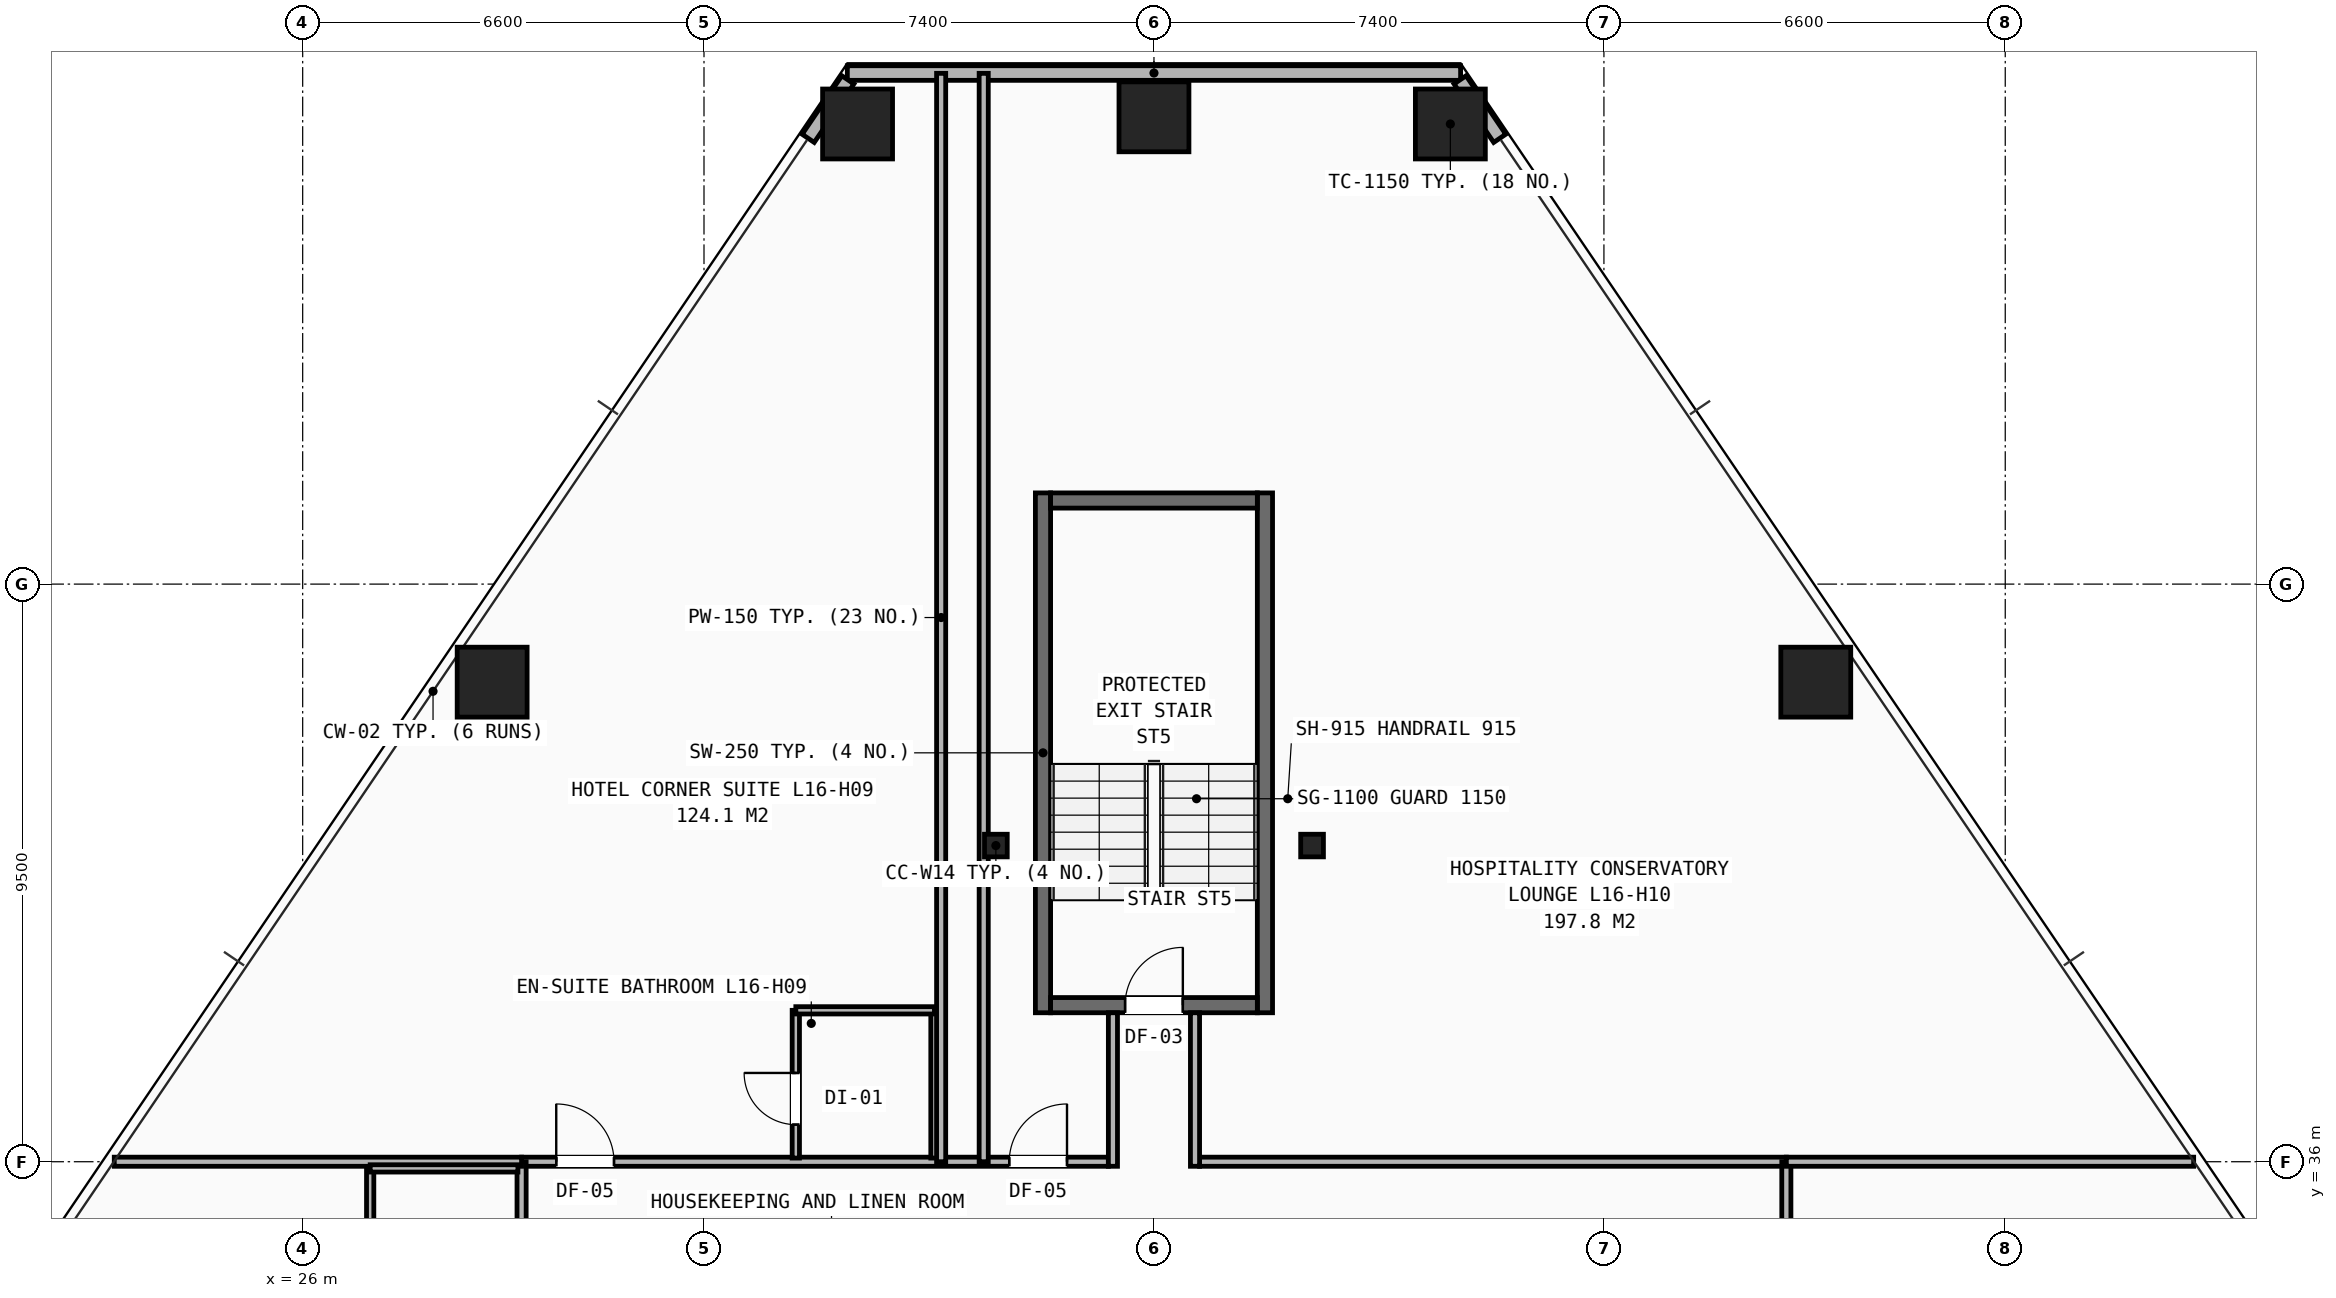
"""IFC4 building model, lengths in metres.
Left out: names, types, materials, properties, quantities, classifications, styles, units other than length and angle.
Written with IfcOpenShell. Run it as: python <this file> out.ifc"""

import sys

from ifc_helpers import new_model, si_unit, direction, frame, frame_2d, origin, origin_2d, place, context, subcontext, project, spatial, rectangle, hollow_rectangle, i_section, extrude, element, fill, save


model = new_model("IFC4")
c1 = context("Model", 3, precision=1e-05, world=origin(), true_north=direction((0.0, 1.0)))
c2 = subcontext(c1, "Body", "Model", "MODEL_VIEW")
j1 = project(units=[si_unit("LENGTHUNIT", "METRE"), si_unit("PLANEANGLEUNIT", "RADIAN")], contexts=[c1])
p1 = place(None, origin())
s1 = spatial("IfcSite", under=j1, at=p1, CompositionType="ELEMENT")
p2 = place(p1, origin())
s2 = spatial("IfcBuilding", under=s1, at=p2, CompositionType="ELEMENT")
p3 = place(p2, frame((0.0, 0.0, 59.2)))
s3 = spatial("IfcBuildingStorey", under=s2, at=p3, CompositionType="ELEMENT", Elevation=59.2)
for number, where, z_axis, x_axis in (
    (1, (37.4, 41.2, 0.0), (0.0, 0.0, 1.0), (1.0, 0.0, 0.0)),
    (2, (42.6, 41.2, 0.0), (0.0, 0.0, 1.0), (1.0, 0.0, 0.0)),
):
    element("IfcColumn", number, at=place(p3, frame(where, z_axis=z_axis, x_axis=x_axis)), inside=s3, PredefinedType="COLUMN", context=c2, shape_type="SweptSolid", body=[
        extrude(i_section(OverallWidth=0.374, OverallDepth=0.372, WebThickness=0.016, FlangeThickness=0.026, at=origin_2d()), origin(), (0.0, 0.0, 1.0), 3.2),
    ])
for number, where, z_axis, x_axis in (
    (3, (44.875, 53.068, 0.0), (0.0, 0.0, 1.0), (1.0, 0.0, 0.0)),
    (4, (40.0, 53.186, 0.0), (0.0, 0.0, 1.0), (1.0, 0.0, 0.0)),
    (5, (35.125, 53.068, 0.0), (0.0, 0.0, 1.0), (1.0, 0.0, 0.0)),
    (6, (29.116, 43.887, 0.0), (0.0, 0.0, 1.0), (1.0, 0.0, 0.0)),
    (7, (50.884, 43.887, 0.0), (0.0, 0.0, 1.0), (1.0, 0.0, 0.0)),
):
    element("IfcColumn", number, at=place(p3, frame(where, z_axis=z_axis, x_axis=x_axis)), inside=s3, PredefinedType="COLUMN", context=c2, shape_type="SweptSolid", body=[
        extrude(hollow_rectangle(XDim=1.15, YDim=1.15, WallThickness=0.075, at=origin_2d()), origin(), (0.0, 0.0, 1.0), 3.2),
    ])
p4 = place(p3, frame((34.957, 53.906, 0.0), z_axis=(0.0, 0.0, 1.0), x_axis=(1.0, 0.0, 0.0)))
e8 = element("IfcWall", 8, at=p4, inside=s3, PredefinedType="SHEAR", context=c2, shape_type="SweptSolid", body=[
    extrude(rectangle(XDim=10.086, YDim=0.24, at=frame_2d((5.043, 0.0))), origin(), (0.0, 0.0, 1.0), 2.263),
])
for number, where, z_axis, x_axis in (
    (9, (34.966, 53.794, 0.0), (0.0, 0.0, 1.0), (-0.561, -0.828, 0.0)),
    (10, (45.687, 52.832, 0.0), (0.0, 0.0, 1.0), (-0.561, 0.828, 0.0)),
):
    element("IfcWall", number, at=place(p3, frame(where, z_axis=z_axis, x_axis=x_axis)), inside=s3, PredefinedType="SHEAR", context=c2, shape_type="SweptSolid", body=[
        extrude(rectangle(XDim=1.163, YDim=0.24, at=frame_2d((0.581, 0.0))), origin(), (0.0, 0.0, 1.0), 2.263),
    ])
p5 = place(p3, frame((29.6, 36.0, 0.0), z_axis=(0.0, 0.0, 1.0), x_axis=(1.0, 0.0, 0.0)))
e11 = element("IfcWall", 11, at=p5, inside=s3, PredefinedType="PARTITIONING", context=c2, shape_type="SweptSolid", body=[
    extrude(rectangle(XDim=9.65, YDim=0.15, at=frame_2d((4.825, 0.0))), origin(), (0.0, 0.0, 1.0), 2.98),
])
p6 = place(p5, frame((0.57, 0.0, 0.0)))
e12 = element("IfcOpeningElement", 12, at=p6, cuts=e11, PredefinedType="OPENING", context=c2, shape_type="SweptSolid", body=[
    extrude(rectangle(XDim=0.95, YDim=2.1, at=frame_2d((0.475, 1.05))), frame((0.0, 0.085, 0.0), z_axis=(0.0, -1.0, 0.0), x_axis=(1.0, 0.0, 0.0)), (0.0, 0.0, 1.0), 0.17),
])
p7 = place(p5, frame((8.02, 0.0, 0.0)))
e13 = element("IfcOpeningElement", 13, at=p7, cuts=e11, PredefinedType="OPENING", context=c2, shape_type="SweptSolid", body=[
    extrude(rectangle(XDim=0.95, YDim=2.1, at=frame_2d((0.475, 1.05))), frame((0.0, 0.085, 0.0), z_axis=(0.0, -1.0, 0.0), x_axis=(1.0, 0.0, 0.0)), (0.0, 0.0, 1.0), 0.17),
])
p8 = place(p3, frame((40.75, 36.0, 0.0), z_axis=(0.0, 0.0, 1.0), x_axis=(1.0, 0.0, 0.0)))
e14 = element("IfcWall", 14, at=p8, inside=s3, PredefinedType="PARTITIONING", context=c2, shape_type="SweptSolid", body=[
    extrude(rectangle(XDim=9.65, YDim=0.15, at=frame_2d((4.825, 0.0))), origin(), (0.0, 0.0, 1.0), 2.513),
])
p9 = place(p3, frame((29.6, 14.1, 0.0), z_axis=(0.0, 0.0, 1.0), x_axis=(0.0, 1.0, 0.0)))
e15 = element("IfcWall", 15, at=p9, inside=s3, PredefinedType="PARTITIONING", context=c2, shape_type="SweptSolid", body=[
    extrude(rectangle(XDim=21.9, YDim=0.15, at=frame_2d((10.95, 0.0))), origin(), (0.0, 0.0, 1.0), 2.191),
])
p10 = place(p9, frame((0.42, 0.0, 0.0)))
e16 = element("IfcOpeningElement", 16, at=p10, cuts=e15, PredefinedType="OPENING", context=c2, shape_type="SweptSolid", body=[
    extrude(rectangle(XDim=0.95, YDim=2.1, at=frame_2d((0.475, 1.05))), frame((0.0, 0.085, 0.0), z_axis=(0.0, -1.0, 0.0), x_axis=(1.0, 0.0, 0.0)), (0.0, 0.0, 1.0), 0.17),
])
p11 = place(p9, frame((11.12, 0.0, 0.0)))
e17 = element("IfcOpeningElement", 17, at=p11, cuts=e15, PredefinedType="OPENING", context=c2, shape_type="SweptSolid", body=[
    extrude(rectangle(XDim=0.95, YDim=2.1, at=frame_2d((0.475, 1.05))), frame((0.0, 0.085, 0.0), z_axis=(0.0, -1.0, 0.0), x_axis=(1.0, 0.0, 0.0)), (0.0, 0.0, 1.0), 0.17),
])
p12 = place(p3, frame((50.4, 14.1, 0.0), z_axis=(0.0, 0.0, 1.0), x_axis=(0.0, 1.0, 0.0)))
e18 = element("IfcWall", 18, at=p12, inside=s3, PredefinedType="PARTITIONING", context=c2, shape_type="SweptSolid", body=[
    extrude(rectangle(XDim=21.9, YDim=0.15, at=frame_2d((10.95, 0.0))), origin(), (0.0, 0.0, 1.0), 2.191),
])
p13 = place(p12, frame((0.42, 0.0, 0.0)))
e19 = element("IfcOpeningElement", 19, at=p13, cuts=e18, PredefinedType="OPENING", context=c2, shape_type="SweptSolid", body=[
    extrude(rectangle(XDim=0.95, YDim=2.1, at=frame_2d((0.475, 1.05))), frame((0.0, 0.085, 0.0), z_axis=(0.0, -1.0, 0.0), x_axis=(1.0, 0.0, 0.0)), (0.0, 0.0, 1.0), 0.17),
])
p14 = place(p12, frame((11.52, 0.0, 0.0)))
e20 = element("IfcOpeningElement", 20, at=p14, cuts=e18, PredefinedType="OPENING", context=c2, shape_type="SweptSolid", body=[
    extrude(rectangle(XDim=0.95, YDim=2.1, at=frame_2d((0.475, 1.05))), frame((0.0, 0.085, 0.0), z_axis=(0.0, -1.0, 0.0), x_axis=(1.0, 0.0, 0.0)), (0.0, 0.0, 1.0), 0.17),
])
p15 = place(p3, frame((22.901, 36.0, 0.0), z_axis=(0.0, 0.0, 1.0), x_axis=(1.0, 0.0, 0.0)))
e21 = element("IfcWall", 21, at=p15, inside=s3, PredefinedType="PARTITIONING", context=c2, shape_type="SweptSolid", body=[
    extrude(rectangle(XDim=6.699, YDim=0.15, at=frame_2d((3.349, 0.0))), origin(), (0.0, 0.0, 1.0), 2.268),
])
p16 = place(p3, frame((27.11, 33.61, 0.0), z_axis=(0.0, 0.0, 1.0), x_axis=(0.0, 1.0, 0.0)))
e22 = element("IfcWall", 22, at=p16, inside=s3, PredefinedType="PARTITIONING", context=c2, shape_type="SweptSolid", body=[
    extrude(rectangle(XDim=2.28, YDim=0.12, at=frame_2d((1.14, 0.0))), origin(), (0.0, 0.0, 1.0), 2.513),
])
p17 = place(p3, frame((27.11, 35.89, 0.0), z_axis=(0.0, 0.0, 1.0), x_axis=(1.0, 0.0, 0.0)))
e23 = element("IfcWall", 23, at=p17, inside=s3, PredefinedType="PARTITIONING", context=c2, shape_type="SweptSolid", body=[
    extrude(rectangle(XDim=2.43, YDim=0.12, at=frame_2d((1.215, 0.0))), origin(), (0.0, 0.0, 1.0), 2.513),
])
p18 = place(p3, frame((50.4, 36.0, 0.0), z_axis=(0.0, 0.0, 1.0), x_axis=(1.0, 0.0, 0.0)))
e24 = element("IfcWall", 24, at=p18, inside=s3, PredefinedType="PARTITIONING", context=c2, shape_type="SweptSolid", body=[
    extrude(rectangle(XDim=6.699, YDim=0.15, at=frame_2d((3.349, 0.0))), origin(), (0.0, 0.0, 1.0), 2.268),
])
p19 = place(p3, frame((34.11, 36.06, 0.0), z_axis=(0.0, 0.0, 1.0), x_axis=(0.0, 1.0, 0.0)))
e25 = element("IfcWall", 25, at=p19, inside=s3, PredefinedType="PARTITIONING", context=c2, shape_type="SweptSolid", body=[
    extrude(rectangle(XDim=2.43, YDim=0.12, at=frame_2d((1.215, 0.0))), origin(), (0.0, 0.0, 1.0), 2.98),
])
p20 = place(p19, frame((0.55, 0.0, 0.0)))
e26 = element("IfcOpeningElement", 26, at=p20, cuts=e25, PredefinedType="OPENING", context=c2, shape_type="SweptSolid", body=[
    extrude(rectangle(XDim=0.85, YDim=2.05, at=frame_2d((0.425, 1.025))), frame((0.0, 0.07, 0.0), z_axis=(0.0, -1.0, 0.0), x_axis=(1.0, 0.0, 0.0)), (0.0, 0.0, 1.0), 0.14),
])
p21 = place(p3, frame((36.39, 36.06, 0.0), z_axis=(0.0, 0.0, 1.0), x_axis=(0.0, 1.0, 0.0)))
e27 = element("IfcWall", 27, at=p21, inside=s3, PredefinedType="PARTITIONING", context=c2, shape_type="SweptSolid", body=[
    extrude(rectangle(XDim=2.43, YDim=0.12, at=frame_2d((1.215, 0.0))), origin(), (0.0, 0.0, 1.0), 2.98),
])
p22 = place(p3, frame((34.11, 38.49, 0.0), z_axis=(0.0, 0.0, 1.0), x_axis=(1.0, 0.0, 0.0)))
e28 = element("IfcWall", 28, at=p22, inside=s3, PredefinedType="PARTITIONING", context=c2, shape_type="SweptSolid", body=[
    extrude(rectangle(XDim=2.28, YDim=0.12, at=frame_2d((1.14, 0.0))), origin(), (0.0, 0.0, 1.0), 2.98),
])
for number, where, z_axis, x_axis in (
    (29, (36.5, 36.0, 0.0), (0.0, 0.0, 1.0), (0.0, 1.0, 0.0)),
    (30, (37.2, 36.0, 0.0), (0.0, 0.0, 1.0), (0.0, 1.0, 0.0)),
):
    element("IfcWall", number, at=place(p3, frame(where, z_axis=z_axis, x_axis=x_axis)), inside=s3, PredefinedType="PARTITIONING", context=c2, shape_type="SweptSolid", body=[
        extrude(rectangle(XDim=17.9, YDim=0.15, at=frame_2d((8.95, 0.0))), origin(), (0.0, 0.0, 1.0), 2.191),
    ])
for number, where, z_axis, x_axis in (
    (31, (38.175, 38.45, 0.0), (0.0, 0.0, 1.0), (0.0, 1.0, 0.0)),
    (32, (41.825, 38.45, 0.0), (0.0, 0.0, 1.0), (0.0, 1.0, 0.0)),
):
    element("IfcWall", number, at=place(p3, frame(where, z_axis=z_axis, x_axis=x_axis)), inside=s3, PredefinedType="SHEAR", context=c2, shape_type="SweptSolid", body=[
        extrude(rectangle(XDim=8.55, YDim=0.25, at=frame_2d((4.275, 0.0))), origin(), (0.0, 0.0, 1.0), 2.98),
    ])
p23 = place(p3, frame((38.3, 38.575, 0.0), z_axis=(0.0, 0.0, 1.0), x_axis=(1.0, 0.0, 0.0)))
e33 = element("IfcWall", 33, at=p23, inside=s3, PredefinedType="SHEAR", context=c2, shape_type="SweptSolid", body=[
    extrude(rectangle(XDim=3.4, YDim=0.25, at=frame_2d((1.7, 0.0))), origin(), (0.0, 0.0, 1.0), 2.98),
])
p24 = place(p23, frame((1.225, 0.0, 0.0)))
e34 = element("IfcOpeningElement", 34, at=p24, cuts=e33, PredefinedType="OPENING", context=c2, shape_type="SweptSolid", body=[
    extrude(rectangle(XDim=0.95, YDim=2.1, at=frame_2d((0.475, 1.05))), frame((0.0, 0.135, 0.0), z_axis=(0.0, -1.0, 0.0), x_axis=(1.0, 0.0, 0.0)), (0.0, 0.0, 1.0), 0.27),
])
p25 = place(p3, frame((38.3, 46.875, 0.0), z_axis=(0.0, 0.0, 1.0), x_axis=(1.0, 0.0, 0.0)))
e35 = element("IfcWall", 35, at=p25, inside=s3, PredefinedType="SHEAR", context=c2, shape_type="SweptSolid", body=[
    extrude(rectangle(XDim=3.4, YDim=0.25, at=frame_2d((1.7, 0.0))), origin(), (0.0, 0.0, 1.0), 2.98),
])
for number, where, z_axis, x_axis in (
    (36, (39.325, 35.925, 0.0), (0.0, 0.0, 1.0), (0.0, 1.0, 0.0)),
    (37, (40.675, 35.925, 0.0), (0.0, 0.0, 1.0), (0.0, 1.0, 0.0)),
):
    element("IfcWall", number, at=place(p3, frame(where, z_axis=z_axis, x_axis=x_axis)), inside=s3, PredefinedType="PARTITIONING", context=c2, shape_type="SweptSolid", body=[
        extrude(rectangle(XDim=2.525, YDim=0.15, at=frame_2d((1.262, 0.0))), origin(), (0.0, 0.0, 1.0), 2.98),
    ])
p26 = place(p6, origin())
e38 = element("IfcDoor", 38, at=p26, inside=s3, OperationType="SINGLE_SWING_LEFT", PredefinedType="DOOR", context=c2, shape_type="SweptSolid", body=[
    extrude(rectangle(XDim=0.95, YDim=2.1, at=frame_2d((0.475, 1.05))), frame((0.0, 0.025, 0.0), z_axis=(0.0, -1.0, 0.0), x_axis=(1.0, 0.0, 0.0)), (0.0, 0.0, 1.0), 0.05),
])
fill(e12, e38)
p27 = place(p20, origin())
e39 = element("IfcDoor", 39, at=p27, inside=s3, OperationType="SINGLE_SWING_RIGHT", PredefinedType="DOOR", context=c2, shape_type="SweptSolid", body=[
    extrude(rectangle(XDim=0.85, YDim=2.05, at=frame_2d((0.425, 1.025))), frame((0.0, 0.025, 0.0), z_axis=(0.0, -1.0, 0.0), x_axis=(1.0, 0.0, 0.0)), (0.0, 0.0, 1.0), 0.05),
])
fill(e26, e39)
p28 = place(p7, origin())
e40 = element("IfcDoor", 40, at=p28, inside=s3, OperationType="SINGLE_SWING_RIGHT", PredefinedType="DOOR", context=c2, shape_type="SweptSolid", body=[
    extrude(rectangle(XDim=0.95, YDim=2.1, at=frame_2d((0.475, 1.05))), frame((0.0, 0.025, 0.0), z_axis=(0.0, -1.0, 0.0), x_axis=(1.0, 0.0, 0.0)), (0.0, 0.0, 1.0), 0.05),
])
fill(e13, e40)
p29 = place(p24, origin())
e41 = element("IfcDoor", 41, at=p29, inside=s3, OperationType="SINGLE_SWING_RIGHT", PredefinedType="DOOR", context=c2, shape_type="SweptSolid", body=[
    extrude(rectangle(XDim=0.95, YDim=2.1, at=frame_2d((0.475, 1.05))), frame((0.0, 0.025, 0.0), z_axis=(0.0, -1.0, 0.0), x_axis=(1.0, 0.0, 0.0)), (0.0, 0.0, 1.0), 0.05),
])
fill(e34, e41)
save(model, sys.argv[1])
